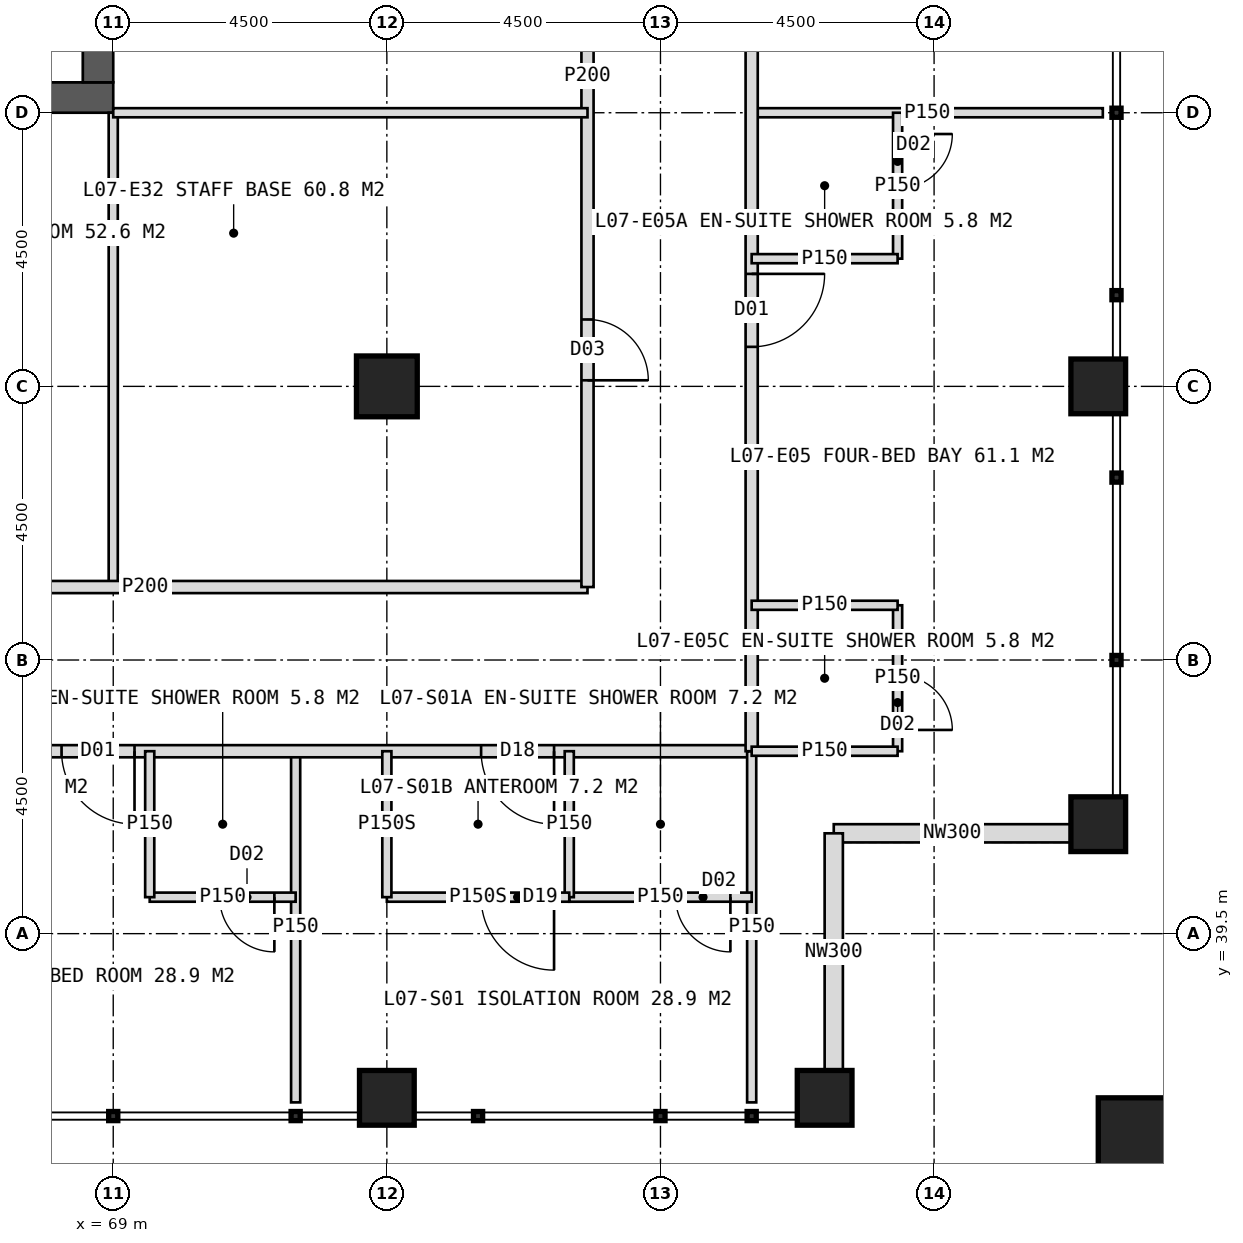
"""IFC4 building model, lengths in metres.
Left out: names, types, materials, properties, quantities, classifications, styles, units other than length and angle.
Written with IfcOpenShell. Run it as: python <this file> out.ifc"""

import sys

from ifc_helpers import new_model, si_unit, direction, frame, frame_2d, origin, origin_2d, place, context, subcontext, project, spatial, rectangle, hollow_rectangle, extrude, element, fill, save


model = new_model("IFC4")
c1 = context("Model", 3, precision=1e-05, world=origin(), true_north=direction((0.0, 1.0)))
c2 = subcontext(c1, "Body", "Model", "MODEL_VIEW")
j1 = project(units=[si_unit("LENGTHUNIT", "METRE"), si_unit("PLANEANGLEUNIT", "RADIAN")], contexts=[c1])
p1 = place(None, origin())
s1 = spatial("IfcSite", under=j1, at=p1, CompositionType="ELEMENT")
p2 = place(p1, origin())
s2 = spatial("IfcBuilding", under=s1, at=p2, CompositionType="ELEMENT")
p3 = place(p2, frame((0.0, 0.0, 35.0)))
s3 = spatial("IfcBuildingStorey", under=s2, at=p3, CompositionType="ELEMENT", Elevation=35.0)
p4 = place(p3, frame((51.0, 53.25, 0.0), z_axis=(0.0, 0.0, 1.0), x_axis=(1.0, 0.0, 0.0)))
e1 = element("IfcWall", 1, at=p4, inside=s3, PredefinedType="SHEAR", context=c2, shape_type="SweptSolid", body=[
    extrude(rectangle(XDim=18.0, YDim=0.5, at=frame_2d((9.0, 0.0))), origin(), (0.0, 0.0, 1.0), 4.0),
])
p5 = place(p4, frame((8.1, 0.0, 0.0)))
e2 = element("IfcOpeningElement", 2, at=p5, cuts=e1, PredefinedType="OPENING", context=c2, shape_type="SweptSolid", body=[
    extrude(rectangle(XDim=1.8, YDim=2.2, at=frame_2d((0.9, 1.1))), frame((0.0, 0.26, 0.0), z_axis=(0.0, -1.0, 0.0), x_axis=(1.0, 0.0, 0.0)), (0.0, 0.0, 1.0), 0.52),
])
p6 = place(p3, frame((68.75, 53.5, 0.0), z_axis=(0.0, 0.0, 1.0), x_axis=(0.0, 1.0, 0.0)))
e3 = element("IfcWall", 3, at=p6, inside=s3, PredefinedType="SHEAR", context=c2, shape_type="SweptSolid", body=[
    extrude(rectangle(XDim=17.0, YDim=0.5, at=frame_2d((8.5, 0.0))), origin(), (0.0, 0.0, 1.0), 4.0),
])
p7 = place(p6, frame((9.5, 0.0, 0.0)))
e4 = element("IfcOpeningElement", 4, at=p7, cuts=e3, PredefinedType="OPENING", context=c2, shape_type="SweptSolid", body=[
    extrude(rectangle(XDim=1.5, YDim=2.2, at=frame_2d((0.75, 1.1))), frame((0.0, 0.26, 0.0), z_axis=(0.0, -1.0, 0.0), x_axis=(1.0, 0.0, 0.0)), (0.0, 0.0, 1.0), 0.52),
])
p8 = place(p3, frame((73.5, 48.5, 0.0), z_axis=(0.0, 0.0, 1.0), x_axis=(1.0, 0.0, 0.0)))
e5 = element("IfcColumn", 5, at=p8, inside=s3, PredefinedType="COLUMN", context=c2, shape_type="SweptSolid", body=[
    extrude(hollow_rectangle(XDim=1.0, YDim=1.0, WallThickness=0.1, at=origin_2d()), origin(), (0.0, 0.0, 1.0), 4.0),
])
for number, where, z_axis, x_axis in (
    (6, (85.2, 41.3, 0.0), (0.0, 0.0, 1.0), (1.0, 0.0, 0.0)),
    (7, (85.2, 48.5, 0.0), (0.0, 0.0, 1.0), (1.0, 0.0, 0.0)),
    (8, (73.5, 36.8, 0.0), (0.0, 0.0, 1.0), (1.0, 0.0, 0.0)),
    (9, (80.7, 36.8, 0.0), (0.0, 0.0, 1.0), (1.0, 0.0, 0.0)),
):
    element("IfcColumn", number, at=place(p3, frame(where, z_axis=z_axis, x_axis=x_axis)), inside=s3, PredefinedType="COLUMN", context=c2, shape_type="SweptSolid", body=[
        extrude(hollow_rectangle(XDim=0.9, YDim=0.9, WallThickness=0.08, at=origin_2d()), origin(), (0.0, 0.0, 1.0), 4.0),
    ])
p9 = place(p3, frame((86.1, 35.9, 0.0), z_axis=(0.0, 0.0, 1.0), x_axis=(1.0, 0.0, 0.0)))
e10 = element("IfcColumn", 10, at=p9, inside=s3, PredefinedType="COLUMN", context=c2, shape_type="SweptSolid", body=[
    extrude(hollow_rectangle(XDim=1.8, YDim=1.8, WallThickness=0.1, at=origin_2d()), origin(), (0.0, 0.0, 1.0), 4.0),
])
for number, where, z_axis, x_axis in (
    (11, (84.75, 41.15, 0.0), (0.0, 0.0, 1.0), (-1.0, 0.0, 0.0)),
    (12, (80.85, 41.15, 0.0), (0.0, 0.0, 1.0), (0.0, -1.0, 0.0)),
):
    element("IfcWall", number, at=place(p3, frame(where, z_axis=z_axis, x_axis=x_axis)), inside=s3, PredefinedType="ELEMENTEDWALL", context=c2, shape_type="SweptSolid", body=[
        extrude(rectangle(XDim=3.9, YDim=0.3, at=frame_2d((1.95, 0.0))), origin(), (0.0, 0.0, 1.0), 2.95),
    ])
p10 = place(p3, frame((72.0, 42.5, 0.0), z_axis=(0.0, 0.0, 1.0), x_axis=(0.0, -1.0, 0.0)))
e13 = element("IfcWall", 13, at=p10, inside=s3, PredefinedType="PARTITIONING", context=c2, shape_type="SweptSolid", body=[
    extrude(rectangle(XDim=5.775, YDim=0.15, at=frame_2d((2.887, 0.0))), origin(), (0.0, 0.0, 1.0), 3.75),
])
p11 = place(p3, frame((79.5, 42.5, 0.0), z_axis=(0.0, 0.0, 1.0), x_axis=(-1.0, 0.0, 0.0)))
e14 = element("IfcWall", 14, at=p11, inside=s3, PredefinedType="PARTITIONING", context=c2, shape_type="SweptSolid", body=[
    extrude(rectangle(XDim=39.0, YDim=0.2, at=frame_2d((19.5, 0.0))), origin(), (0.0, 0.0, 1.0), 3.75),
])
p12 = place(p11, frame((3.25, 0.0, 0.0)))
e15 = element("IfcOpeningElement", 15, at=p12, cuts=e14, PredefinedType="OPENING", context=c2, shape_type="SweptSolid", body=[
    extrude(rectangle(XDim=1.2, YDim=2.2, at=frame_2d((0.6, 1.1))), frame((0.0, 0.11, 0.0), z_axis=(0.0, -1.0, 0.0), x_axis=(1.0, 0.0, 0.0)), (0.0, 0.0, 1.0), 0.22),
])
p13 = place(p11, frame((10.15, 0.0, 0.0)))
e16 = element("IfcOpeningElement", 16, at=p13, cuts=e14, PredefinedType="OPENING", context=c2, shape_type="SweptSolid", body=[
    extrude(rectangle(XDim=1.2, YDim=2.2, at=frame_2d((0.6, 1.1))), frame((0.0, 0.11, 0.0), z_axis=(0.0, -1.0, 0.0), x_axis=(1.0, 0.0, 0.0)), (0.0, 0.0, 1.0), 0.22),
])
p14 = place(p11, frame((16.15, 0.0, 0.0)))
e17 = element("IfcOpeningElement", 17, at=p14, cuts=e14, PredefinedType="OPENING", context=c2, shape_type="SweptSolid", body=[
    extrude(rectangle(XDim=1.2, YDim=2.2, at=frame_2d((0.6, 1.1))), frame((0.0, 0.11, 0.0), z_axis=(0.0, -1.0, 0.0), x_axis=(1.0, 0.0, 0.0)), (0.0, 0.0, 1.0), 0.22),
])
p15 = place(p11, frame((22.75, 0.0, 0.0)))
e18 = element("IfcOpeningElement", 18, at=p15, cuts=e14, PredefinedType="OPENING", context=c2, shape_type="SweptSolid", body=[
    extrude(rectangle(XDim=1.2, YDim=2.2, at=frame_2d((0.6, 1.1))), frame((0.0, 0.11, 0.0), z_axis=(0.0, -1.0, 0.0), x_axis=(1.0, 0.0, 0.0)), (0.0, 0.0, 1.0), 0.22),
])
p16 = place(p11, frame((31.15, 0.0, 0.0)))
e19 = element("IfcOpeningElement", 19, at=p16, cuts=e14, PredefinedType="OPENING", context=c2, shape_type="SweptSolid", body=[
    extrude(rectangle(XDim=1.2, YDim=2.2, at=frame_2d((0.6, 1.1))), frame((0.0, 0.11, 0.0), z_axis=(0.0, -1.0, 0.0), x_axis=(1.0, 0.0, 0.0)), (0.0, 0.0, 1.0), 0.22),
])
p17 = place(p3, frame((79.5, 42.5, 0.0), z_axis=(0.0, 0.0, 1.0), x_axis=(0.0, -1.0, 0.0)))
e20 = element("IfcWall", 20, at=p17, inside=s3, PredefinedType="PARTITIONING", context=c2, shape_type="SweptSolid", body=[
    extrude(rectangle(XDim=5.775, YDim=0.15, at=frame_2d((2.887, 0.0))), origin(), (0.0, 0.0, 1.0), 3.75),
])
p18 = place(p3, frame((79.5, 40.1, 0.0), z_axis=(0.0, 0.0, 1.0), x_axis=(-1.0, 0.0, 0.0)))
e21 = element("IfcWall", 21, at=p18, inside=s3, PredefinedType="PARTITIONING", context=c2, shape_type="SweptSolid", body=[
    extrude(rectangle(XDim=3.0, YDim=0.15, at=frame_2d((1.5, 0.0))), origin(), (0.0, 0.0, 1.0), 3.75),
])
p19 = place(p18, frame((0.35, 0.0, 0.0)))
e22 = element("IfcOpeningElement", 22, at=p19, cuts=e21, PredefinedType="OPENING", context=c2, shape_type="SweptSolid", body=[
    extrude(rectangle(XDim=0.9, YDim=2.1, at=frame_2d((0.45, 1.05))), frame((0.0, 0.085, 0.0), z_axis=(0.0, -1.0, 0.0), x_axis=(1.0, 0.0, 0.0)), (0.0, 0.0, 1.0), 0.17),
])
p20 = place(p3, frame((76.5, 42.5, 0.0), z_axis=(0.0, 0.0, 1.0), x_axis=(0.0, -1.0, 0.0)))
e23 = element("IfcWall", 23, at=p20, inside=s3, PredefinedType="PARTITIONING", context=c2, shape_type="SweptSolid", body=[
    extrude(rectangle(XDim=2.4, YDim=0.15, at=frame_2d((1.2, 0.0))), origin(), (0.0, 0.0, 1.0), 3.75),
])
p21 = place(p3, frame((76.5, 40.1, 0.0), z_axis=(0.0, 0.0, 1.0), x_axis=(-1.0, 0.0, 0.0)))
e24 = element("IfcWall", 24, at=p21, inside=s3, PredefinedType="PARTITIONING", context=c2, shape_type="SweptSolid", body=[
    extrude(rectangle(XDim=3.0, YDim=0.15, at=frame_2d((1.5, 0.0))), origin(), (0.0, 0.0, 1.0), 3.75),
])
p22 = place(p21, frame((0.25, 0.0, 0.0)))
e25 = element("IfcOpeningElement", 25, at=p22, cuts=e24, PredefinedType="OPENING", context=c2, shape_type="SweptSolid", body=[
    extrude(rectangle(XDim=1.2, YDim=2.2, at=frame_2d((0.6, 1.1))), frame((0.0, 0.085, 0.0), z_axis=(0.0, -1.0, 0.0), x_axis=(1.0, 0.0, 0.0)), (0.0, 0.0, 1.0), 0.17),
])
p23 = place(p3, frame((73.5, 42.5, 0.0), z_axis=(0.0, 0.0, 1.0), x_axis=(0.0, -1.0, 0.0)))
e26 = element("IfcWall", 26, at=p23, inside=s3, PredefinedType="PARTITIONING", context=c2, shape_type="SweptSolid", body=[
    extrude(rectangle(XDim=2.4, YDim=0.15, at=frame_2d((1.2, 0.0))), origin(), (0.0, 0.0, 1.0), 2.95),
])
p24 = place(p3, frame((72.0, 40.1, 0.0), z_axis=(0.0, 0.0, 1.0), x_axis=(-1.0, 0.0, 0.0)))
e27 = element("IfcWall", 27, at=p24, inside=s3, PredefinedType="PARTITIONING", context=c2, shape_type="SweptSolid", body=[
    extrude(rectangle(XDim=2.4, YDim=0.15, at=frame_2d((1.2, 0.0))), origin(), (0.0, 0.0, 1.0), 3.75),
])
p25 = place(p24, frame((0.35, 0.0, 0.0)))
e28 = element("IfcOpeningElement", 28, at=p25, cuts=e27, PredefinedType="OPENING", context=c2, shape_type="SweptSolid", body=[
    extrude(rectangle(XDim=0.9, YDim=2.1, at=frame_2d((0.45, 1.05))), frame((0.0, 0.085, 0.0), z_axis=(0.0, -1.0, 0.0), x_axis=(1.0, 0.0, 0.0)), (0.0, 0.0, 1.0), 0.17),
])
p26 = place(p3, frame((69.6, 42.5, 0.0), z_axis=(0.0, 0.0, 1.0), x_axis=(0.0, -1.0, 0.0)))
e29 = element("IfcWall", 29, at=p26, inside=s3, PredefinedType="PARTITIONING", context=c2, shape_type="SweptSolid", body=[
    extrude(rectangle(XDim=2.4, YDim=0.15, at=frame_2d((1.2, 0.0))), origin(), (0.0, 0.0, 1.0), 3.75),
])
p27 = place(p3, frame((69.0, 53.0, 0.0), z_axis=(0.0, 0.0, 1.0), x_axis=(0.0, -1.0, 0.0)))
e30 = element("IfcWall", 30, at=p27, inside=s3, PredefinedType="PARTITIONING", context=c2, shape_type="SweptSolid", body=[
    extrude(rectangle(XDim=7.8, YDim=0.15, at=frame_2d((3.9, 0.0))), origin(), (0.0, 0.0, 1.0), 3.75),
])
p28 = place(p3, frame((76.8, 45.2, 0.0), z_axis=(0.0, 0.0, 1.0), x_axis=(-1.0, 0.0, 0.0)))
e31 = element("IfcWall", 31, at=p28, inside=s3, PredefinedType="PARTITIONING", context=c2, shape_type="SweptSolid", body=[
    extrude(rectangle(XDim=14.55, YDim=0.2, at=frame_2d((7.275, 0.0))), origin(), (0.0, 0.0, 1.0), 3.75),
])
p29 = place(p28, frame((10.675, 0.0, 0.0)))
e32 = element("IfcOpeningElement", 32, at=p29, cuts=e31, PredefinedType="OPENING", context=c2, shape_type="SweptSolid", body=[
    extrude(rectangle(XDim=1.0, YDim=2.1, at=frame_2d((0.5, 1.05))), frame((0.0, 0.11, 0.0), z_axis=(0.0, -1.0, 0.0), x_axis=(1.0, 0.0, 0.0)), (0.0, 0.0, 1.0), 0.22),
])
p30 = place(p3, frame((79.5, 53.0, 0.0), z_axis=(0.0, 0.0, 1.0), x_axis=(1.0, 0.0, 0.0)))
e33 = element("IfcWall", 33, at=p30, inside=s3, PredefinedType="PARTITIONING", context=c2, shape_type="SweptSolid", body=[
    extrude(rectangle(XDim=5.775, YDim=0.15, at=frame_2d((2.887, 0.0))), origin(), (0.0, 0.0, 1.0), 3.75),
])
p31 = place(p3, frame((79.5, 81.5, 0.0), z_axis=(0.0, 0.0, 1.0), x_axis=(0.0, -1.0, 0.0)))
e34 = element("IfcWall", 34, at=p31, inside=s3, PredefinedType="PARTITIONING", context=c2, shape_type="SweptSolid", body=[
    extrude(rectangle(XDim=39.0, YDim=0.2, at=frame_2d((19.5, 0.0))), origin(), (0.0, 0.0, 1.0), 3.75),
])
p32 = place(p31, frame((3.25, 0.0, 0.0)))
e35 = element("IfcOpeningElement", 35, at=p32, cuts=e34, PredefinedType="OPENING", context=c2, shape_type="SweptSolid", body=[
    extrude(rectangle(XDim=1.2, YDim=2.2, at=frame_2d((0.6, 1.1))), frame((0.0, 0.11, 0.0), z_axis=(0.0, -1.0, 0.0), x_axis=(1.0, 0.0, 0.0)), (0.0, 0.0, 1.0), 0.22),
])
p33 = place(p31, frame((10.15, 0.0, 0.0)))
e36 = element("IfcOpeningElement", 36, at=p33, cuts=e34, PredefinedType="OPENING", context=c2, shape_type="SweptSolid", body=[
    extrude(rectangle(XDim=1.2, YDim=2.2, at=frame_2d((0.6, 1.1))), frame((0.0, 0.11, 0.0), z_axis=(0.0, -1.0, 0.0), x_axis=(1.0, 0.0, 0.0)), (0.0, 0.0, 1.0), 0.22),
])
p34 = place(p31, frame((16.15, 0.0, 0.0)))
e37 = element("IfcOpeningElement", 37, at=p34, cuts=e34, PredefinedType="OPENING", context=c2, shape_type="SweptSolid", body=[
    extrude(rectangle(XDim=1.2, YDim=2.2, at=frame_2d((0.6, 1.1))), frame((0.0, 0.11, 0.0), z_axis=(0.0, -1.0, 0.0), x_axis=(1.0, 0.0, 0.0)), (0.0, 0.0, 1.0), 0.22),
])
p35 = place(p31, frame((22.75, 0.0, 0.0)))
e38 = element("IfcOpeningElement", 38, at=p35, cuts=e34, PredefinedType="OPENING", context=c2, shape_type="SweptSolid", body=[
    extrude(rectangle(XDim=1.2, YDim=2.2, at=frame_2d((0.6, 1.1))), frame((0.0, 0.11, 0.0), z_axis=(0.0, -1.0, 0.0), x_axis=(1.0, 0.0, 0.0)), (0.0, 0.0, 1.0), 0.22),
])
p36 = place(p31, frame((31.15, 0.0, 0.0)))
e39 = element("IfcOpeningElement", 39, at=p36, cuts=e34, PredefinedType="OPENING", context=c2, shape_type="SweptSolid", body=[
    extrude(rectangle(XDim=1.2, YDim=2.2, at=frame_2d((0.6, 1.1))), frame((0.0, 0.11, 0.0), z_axis=(0.0, -1.0, 0.0), x_axis=(1.0, 0.0, 0.0)), (0.0, 0.0, 1.0), 0.22),
])
p37 = place(p3, frame((81.9, 53.0, 0.0), z_axis=(0.0, 0.0, 1.0), x_axis=(0.0, -1.0, 0.0)))
e40 = element("IfcWall", 40, at=p37, inside=s3, PredefinedType="PARTITIONING", context=c2, shape_type="SweptSolid", body=[
    extrude(rectangle(XDim=2.4, YDim=0.15, at=frame_2d((1.2, 0.0))), origin(), (0.0, 0.0, 1.0), 3.75),
])
p38 = place(p37, frame((0.35, 0.0, 0.0)))
e41 = element("IfcOpeningElement", 41, at=p38, cuts=e40, PredefinedType="OPENING", context=c2, shape_type="SweptSolid", body=[
    extrude(rectangle(XDim=0.9, YDim=2.1, at=frame_2d((0.45, 1.05))), frame((0.0, 0.085, 0.0), z_axis=(0.0, -1.0, 0.0), x_axis=(1.0, 0.0, 0.0)), (0.0, 0.0, 1.0), 0.17),
])
p39 = place(p3, frame((79.5, 50.6, 0.0), z_axis=(0.0, 0.0, 1.0), x_axis=(1.0, 0.0, 0.0)))
e42 = element("IfcWall", 42, at=p39, inside=s3, PredefinedType="PARTITIONING", context=c2, shape_type="SweptSolid", body=[
    extrude(rectangle(XDim=2.4, YDim=0.15, at=frame_2d((1.2, 0.0))), origin(), (0.0, 0.0, 1.0), 3.75),
])
p40 = place(p3, frame((81.9, 44.9, 0.0), z_axis=(0.0, 0.0, 1.0), x_axis=(0.0, -1.0, 0.0)))
e43 = element("IfcWall", 43, at=p40, inside=s3, PredefinedType="PARTITIONING", context=c2, shape_type="SweptSolid", body=[
    extrude(rectangle(XDim=2.4, YDim=0.15, at=frame_2d((1.2, 0.0))), origin(), (0.0, 0.0, 1.0), 3.75),
])
p41 = place(p40, frame((1.15, 0.0, 0.0)))
e44 = element("IfcOpeningElement", 44, at=p41, cuts=e43, PredefinedType="OPENING", context=c2, shape_type="SweptSolid", body=[
    extrude(rectangle(XDim=0.9, YDim=2.1, at=frame_2d((0.45, 1.05))), frame((0.0, 0.085, 0.0), z_axis=(0.0, -1.0, 0.0), x_axis=(1.0, 0.0, 0.0)), (0.0, 0.0, 1.0), 0.17),
])
for number, where, z_axis, x_axis in (
    (45, (79.5, 44.9, 0.0), (0.0, 0.0, 1.0), (1.0, 0.0, 0.0)),
    (46, (79.5, 42.5, 0.0), (0.0, 0.0, 1.0), (1.0, 0.0, 0.0)),
):
    element("IfcWall", number, at=place(p3, frame(where, z_axis=z_axis, x_axis=x_axis)), inside=s3, PredefinedType="PARTITIONING", context=c2, shape_type="SweptSolid", body=[
        extrude(rectangle(XDim=2.4, YDim=0.15, at=frame_2d((1.2, 0.0))), origin(), (0.0, 0.0, 1.0), 3.75),
    ])
p42 = place(p3, frame((76.8, 62.0, 0.0), z_axis=(0.0, 0.0, 1.0), x_axis=(0.0, -1.0, 0.0)))
e47 = element("IfcWall", 47, at=p42, inside=s3, PredefinedType="PARTITIONING", context=c2, shape_type="SweptSolid", body=[
    extrude(rectangle(XDim=16.8, YDim=0.2, at=frame_2d((8.4, 0.0))), origin(), (0.0, 0.0, 1.0), 3.75),
])
p43 = place(p42, frame((4.0, 0.0, 0.0)))
e48 = element("IfcOpeningElement", 48, at=p43, cuts=e47, PredefinedType="OPENING", context=c2, shape_type="SweptSolid", body=[
    extrude(rectangle(XDim=1.0, YDim=2.1, at=frame_2d((0.5, 1.05))), frame((0.0, 0.11, 0.0), z_axis=(0.0, -1.0, 0.0), x_axis=(1.0, 0.0, 0.0)), (0.0, 0.0, 1.0), 0.22),
])
p44 = place(p42, frame((12.4, 0.0, 0.0)))
e49 = element("IfcOpeningElement", 49, at=p44, cuts=e47, PredefinedType="OPENING", context=c2, shape_type="SweptSolid", body=[
    extrude(rectangle(XDim=1.0, YDim=2.1, at=frame_2d((0.5, 1.05))), frame((0.0, 0.11, 0.0), z_axis=(0.0, -1.0, 0.0), x_axis=(1.0, 0.0, 0.0)), (0.0, 0.0, 1.0), 0.22),
])
p45 = place(p3, frame((69.0, 53.0, 0.0), z_axis=(0.0, 0.0, 1.0), x_axis=(1.0, 0.0, 0.0)))
e50 = element("IfcWall", 50, at=p45, inside=s3, PredefinedType="PARTITIONING", context=c2, shape_type="SweptSolid", body=[
    extrude(rectangle(XDim=7.8, YDim=0.15, at=frame_2d((3.9, 0.0))), origin(), (0.0, 0.0, 1.0), 3.75),
])
p46 = place(p22, origin())
e51 = element("IfcDoor", 51, at=p46, inside=s3, OperationType="SINGLE_SWING_LEFT", PredefinedType="DOOR", context=c2, shape_type="SweptSolid", body=[
    extrude(rectangle(XDim=1.2, YDim=2.2, at=frame_2d((0.6, 1.1))), frame((0.0, 0.025, 0.0), z_axis=(0.0, -1.0, 0.0), x_axis=(1.0, 0.0, 0.0)), (0.0, 0.0, 1.0), 0.05),
])
fill(e25, e51)
p47 = place(p12, origin())
e52 = element("IfcDoor", 52, at=p47, inside=s3, OperationType="SINGLE_SWING_LEFT", PredefinedType="DOOR", context=c2, shape_type="SweptSolid", body=[
    extrude(rectangle(XDim=1.2, YDim=2.2, at=frame_2d((0.6, 1.1))), frame((0.0, 0.025, 0.0), z_axis=(0.0, -1.0, 0.0), x_axis=(1.0, 0.0, 0.0)), (0.0, 0.0, 1.0), 0.05),
])
fill(e15, e52)
p48 = place(p19, origin())
e53 = element("IfcDoor", 53, at=p48, inside=s3, OperationType="SINGLE_SWING_LEFT", PredefinedType="DOOR", context=c2, shape_type="SweptSolid", body=[
    extrude(rectangle(XDim=0.9, YDim=2.1, at=frame_2d((0.45, 1.05))), frame((0.0, 0.025, 0.0), z_axis=(0.0, -1.0, 0.0), x_axis=(1.0, 0.0, 0.0)), (0.0, 0.0, 1.0), 0.05),
])
fill(e22, e53)
p49 = place(p13, origin())
e54 = element("IfcDoor", 54, at=p49, inside=s3, OperationType="SINGLE_SWING_LEFT", PredefinedType="DOOR", context=c2, shape_type="SweptSolid", body=[
    extrude(rectangle(XDim=1.2, YDim=2.2, at=frame_2d((0.6, 1.1))), frame((0.0, 0.025, 0.0), z_axis=(0.0, -1.0, 0.0), x_axis=(1.0, 0.0, 0.0)), (0.0, 0.0, 1.0), 0.05),
])
fill(e16, e54)
p50 = place(p25, origin())
e55 = element("IfcDoor", 55, at=p50, inside=s3, OperationType="SINGLE_SWING_LEFT", PredefinedType="DOOR", context=c2, shape_type="SweptSolid", body=[
    extrude(rectangle(XDim=0.9, YDim=2.1, at=frame_2d((0.45, 1.05))), frame((0.0, 0.025, 0.0), z_axis=(0.0, -1.0, 0.0), x_axis=(1.0, 0.0, 0.0)), (0.0, 0.0, 1.0), 0.05),
])
fill(e28, e55)
p51 = place(p36, origin())
e56 = element("IfcDoor", 56, at=p51, inside=s3, OperationType="SINGLE_SWING_LEFT", PredefinedType="DOOR", context=c2, shape_type="SweptSolid", body=[
    extrude(rectangle(XDim=1.2, YDim=2.2, at=frame_2d((0.6, 1.1))), frame((0.0, 0.025, 0.0), z_axis=(0.0, -1.0, 0.0), x_axis=(1.0, 0.0, 0.0)), (0.0, 0.0, 1.0), 0.05),
])
fill(e39, e56)
p52 = place(p38, origin())
e57 = element("IfcDoor", 57, at=p52, inside=s3, OperationType="SINGLE_SWING_LEFT", PredefinedType="DOOR", context=c2, shape_type="SweptSolid", body=[
    extrude(rectangle(XDim=0.9, YDim=2.1, at=frame_2d((0.45, 1.05))), frame((0.0, 0.025, 0.0), z_axis=(0.0, -1.0, 0.0), x_axis=(1.0, 0.0, 0.0)), (0.0, 0.0, 1.0), 0.05),
])
fill(e41, e57)
p53 = place(p41, origin())
e58 = element("IfcDoor", 58, at=p53, inside=s3, OperationType="SINGLE_SWING_RIGHT", PredefinedType="DOOR", context=c2, shape_type="SweptSolid", body=[
    extrude(rectangle(XDim=0.9, YDim=2.1, at=frame_2d((0.45, 1.05))), frame((0.0, 0.025, 0.0), z_axis=(0.0, -1.0, 0.0), x_axis=(1.0, 0.0, 0.0)), (0.0, 0.0, 1.0), 0.05),
])
fill(e44, e58)
p54 = place(p44, origin())
e59 = element("IfcDoor", 59, at=p54, inside=s3, OperationType="SINGLE_SWING_RIGHT", PredefinedType="DOOR", context=c2, shape_type="SweptSolid", body=[
    extrude(rectangle(XDim=1.0, YDim=2.1, at=frame_2d((0.5, 1.05))), frame((0.0, 0.025, 0.0), z_axis=(0.0, -1.0, 0.0), x_axis=(1.0, 0.0, 0.0)), (0.0, 0.0, 1.0), 0.05),
])
fill(e49, e59)
save(model, sys.argv[1])
